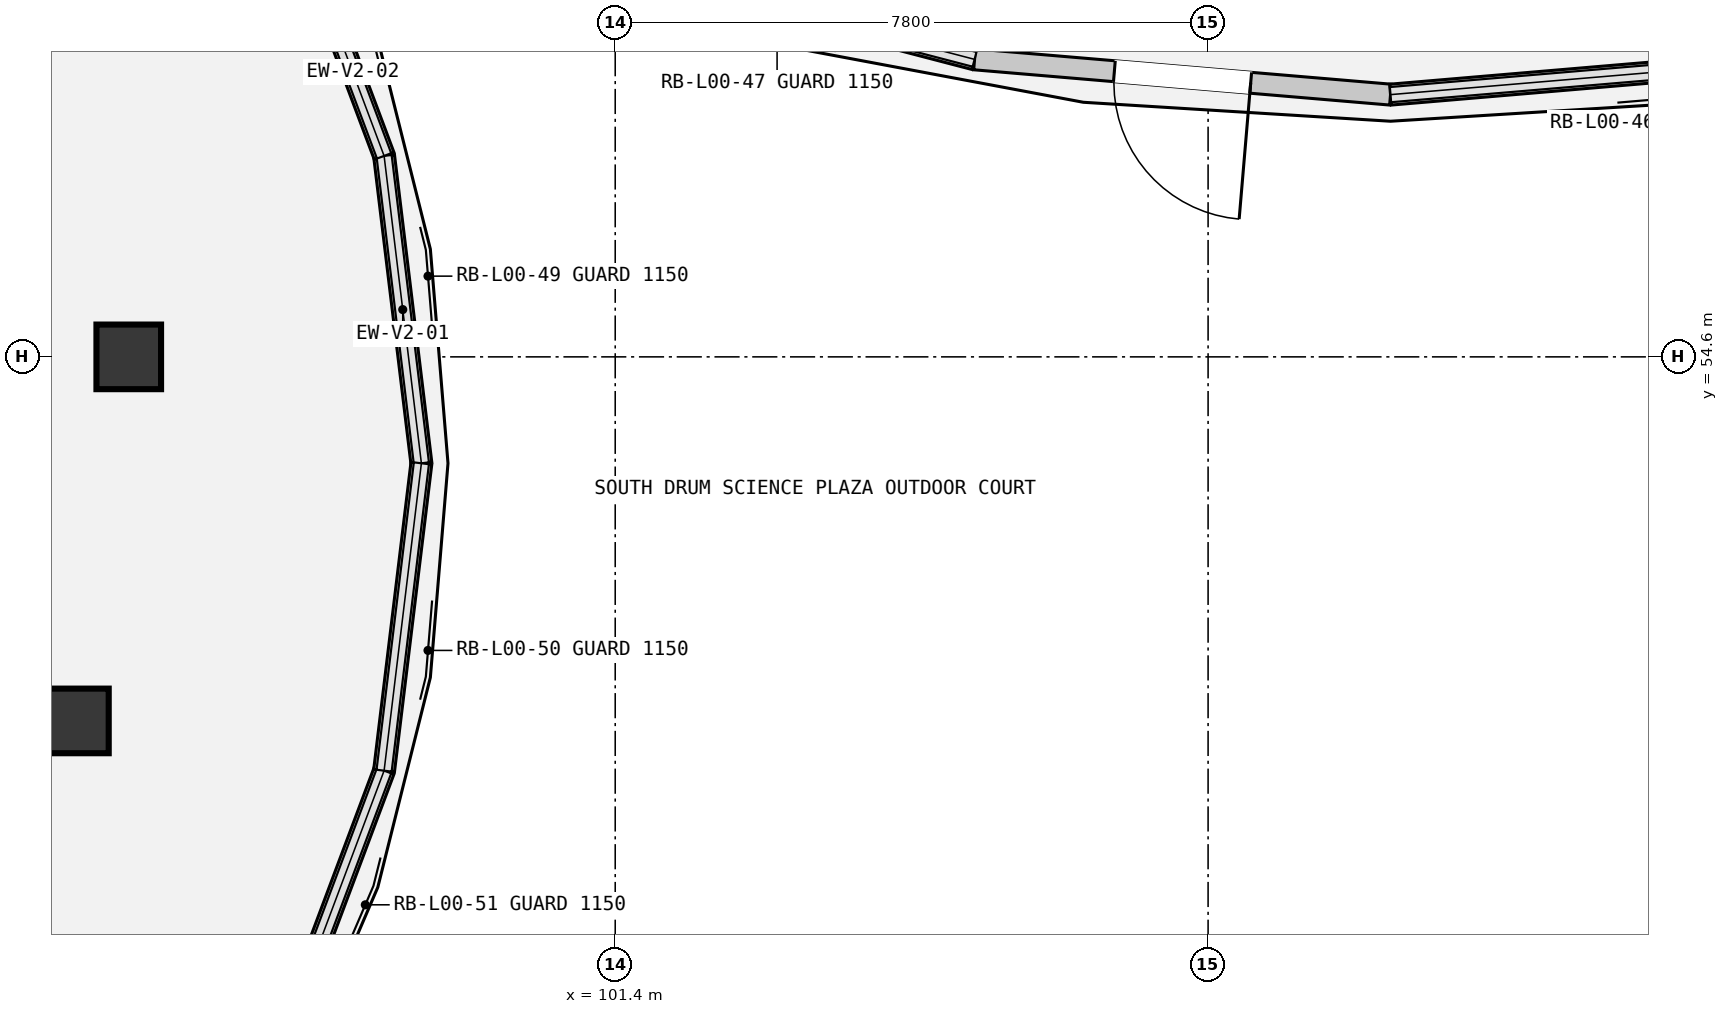
"""IFC4 building model, lengths in metres.
Left out: names, types, materials, properties, quantities, classifications, styles, units other than length and angle.
Written with IfcOpenShell. Run it as: python <this file> out.ifc"""

import sys

from ifc_helpers import new_model, si_unit, direction, frame, frame_2d, origin, origin_2d, place, context, subcontext, project, spatial, rectangle, circle, extrude, element, fill, save


model = new_model("IFC4")
c1 = context("Model", 3, precision=1e-05, world=origin(), true_north=direction((0.0, 1.0)))
c2 = subcontext(c1, "Body", "Model", "MODEL_VIEW")
j1 = project(units=[si_unit("LENGTHUNIT", "METRE"), si_unit("PLANEANGLEUNIT", "RADIAN")], contexts=[c1])
p1 = place(None, origin())
s1 = spatial("IfcSite", under=j1, at=p1, CompositionType="ELEMENT")
p2 = place(p1, origin())
s2 = spatial("IfcBuilding", under=s1, at=p2, CompositionType="ELEMENT")
p3 = place(p2, origin())
s3 = spatial("IfcBuildingStorey", under=s2, at=p3, CompositionType="ELEMENT", Elevation=0.0)
for number, where, z_axis, x_axis in (
    (1, (95.0, 54.6, 0.0), (0.0, 0.0, 1.0), (1.0, 0.0, 0.0)),
    (2, (94.311, 49.811, 0.0), (0.0, 0.0, 1.0), (1.0, 0.0, 0.0)),
):
    element("IfcColumn", number, at=place(p3, frame(where, z_axis=z_axis, x_axis=x_axis)), inside=s3, PredefinedType="COLUMN", context=c2, shape_type="SweptSolid", body=[
        extrude(circle(Radius=0.425, at=origin_2d()), origin(), (0.0, 0.0, 1.0), 5.4),
    ])
p4 = place(p3, frame((98.85, 53.2, 0.0), z_axis=(0.0, 0.0, 1.0), x_axis=(-0.120463814, 0.99271771895, 0.0)))
e3 = element("IfcWall", 3, at=p4, inside=s3, PredefinedType="SOLIDWALL", context=c2, shape_type="SweptSolid", body=[
    extrude(rectangle(XDim=4.074, YDim=0.275, at=frame_2d((2.037, 0.0))), origin(), (0.0, 0.0, 1.0), 1.02),
])
p5 = place(p3, frame((98.359, 57.244, 0.0), z_axis=(0.0, 0.0, 1.0), x_axis=(-0.351123441588, 0.936329177569, 0.0)))
e4 = element("IfcWall", 4, at=p5, inside=s3, PredefinedType="SOLIDWALL", context=c2, shape_type="SweptSolid", body=[
    extrude(rectangle(XDim=4.13, YDim=0.275, at=frame_2d((2.065, 0.0))), origin(), (0.0, 0.0, 1.0), 1.02),
])
p6 = place(p3, frame((96.909, 45.289, 0.0), z_axis=(0.0, 0.0, 1.0), x_axis=(0.351142876569, 0.936321889221, 0.0)))
e5 = element("IfcWall", 5, at=p6, inside=s3, PredefinedType="SOLIDWALL", context=c2, shape_type="SweptSolid", body=[
    extrude(rectangle(XDim=4.13, YDim=0.275, at=frame_2d((2.065, 0.0))), origin(), (0.0, 0.0, 1.0), 1.02),
])
p7 = place(p3, frame((98.359, 49.156, 0.0), z_axis=(0.0, 0.0, 1.0), x_axis=(0.120463814, 0.99271771895, 0.0)))
e6 = element("IfcWall", 6, at=p7, inside=s3, PredefinedType="SOLIDWALL", context=c2, shape_type="SweptSolid", body=[
    extrude(rectangle(XDim=4.074, YDim=0.275, at=frame_2d((2.037, 0.0))), origin(), (0.0, 0.0, 1.0), 1.02),
])
p8 = place(p3, frame((100.866, 59.888, 0.0), z_axis=(0.0, 0.0, 1.0), x_axis=(0.967546202247, -0.252694175866, 0.0)))
e7 = element("IfcWall", 7, at=p8, inside=s3, PredefinedType="SOLIDWALL", context=c2, shape_type="SweptSolid", body=[
    extrude(rectangle(XDim=5.438, YDim=0.275, at=frame_2d((2.719, 0.0))), origin(), (0.0, 0.0, 1.0), 1.02),
])
p9 = place(p3, frame((111.6, 58.05, 0.0), z_axis=(0.0, 0.0, 1.0), x_axis=(-0.996426719811, 0.084461778614, 0.0)))
e8 = element("IfcWall", 8, at=p9, inside=s3, PredefinedType="SOLIDWALL", context=c2, shape_type="SweptSolid", body=[
    extrude(rectangle(XDim=5.492, YDim=0.275, at=frame_2d((2.746, 0.0))), origin(), (0.0, 0.0, 1.0), 4.46),
])
p10 = place(p9, frame((1.846, 0.0, 0.0)))
e9 = element("IfcOpeningElement", 9, at=p10, cuts=e8, PredefinedType="OPENING", context=c2, shape_type="SweptSolid", body=[
    extrude(rectangle(XDim=1.8, YDim=2.4, at=frame_2d((0.9, 1.2))), frame((0.0, 0.147, 0.0), z_axis=(0.0, -1.0, 0.0), x_axis=(1.0, 0.0, 0.0)), (0.0, 0.0, 1.0), 0.295),
])
p11 = place(p3, frame((111.6, 58.05, 0.0), z_axis=(0.0, 0.0, 1.0), x_axis=(0.996426402667, 0.084465519991, 0.0)))
e10 = element("IfcWall", 10, at=p11, inside=s3, PredefinedType="SOLIDWALL", context=c2, shape_type="SweptSolid", body=[
    extrude(rectangle(XDim=5.492, YDim=0.275, at=frame_2d((2.746, 0.0))), origin(), (0.0, 0.0, 1.0), 1.02),
])
p12 = place(p10, origin())
e11 = element("IfcDoor", 11, at=p12, inside=s3, OperationType="DOUBLE_DOOR_SINGLE_SWING", PredefinedType="DOOR", context=c2, shape_type="SweptSolid", body=[
    extrude(rectangle(XDim=1.8, YDim=2.4, at=frame_2d((0.9, 1.2))), frame((0.0, 0.025, 0.0), z_axis=(0.0, -1.0, 0.0), x_axis=(1.0, 0.0, 0.0)), (0.0, 0.0, 1.0), 0.05),
])
fill(e9, e11)
save(model, sys.argv[1])
